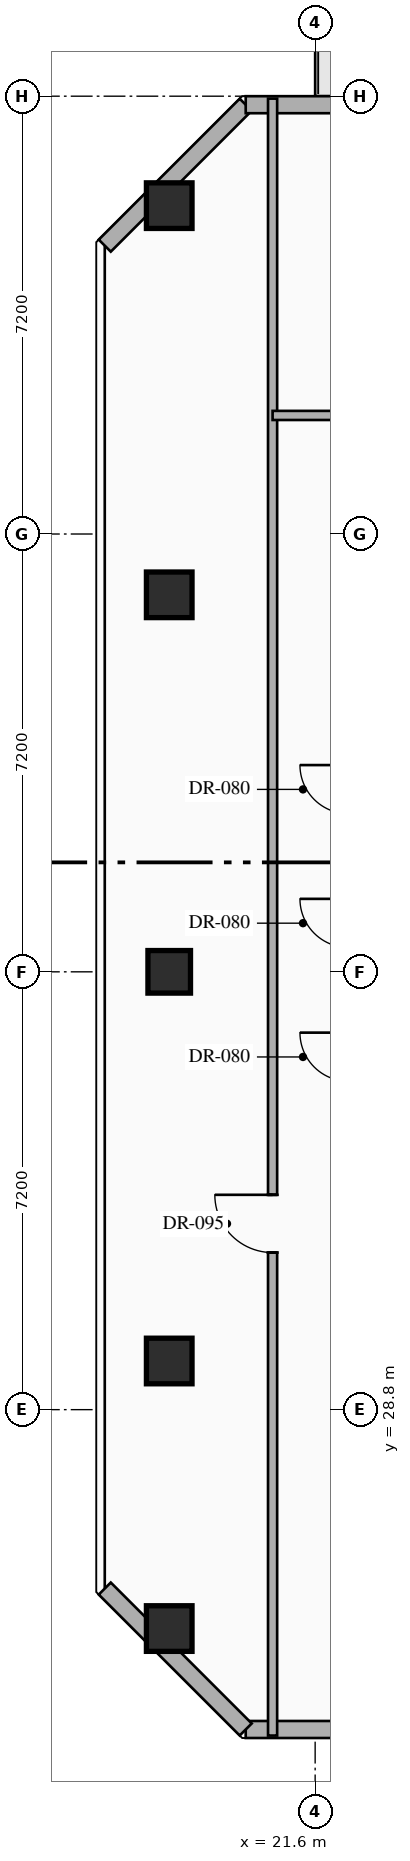
"""IFC4 building model, lengths in metres.
Left out: names, types, materials, properties, quantities, classifications, styles, units other than length and angle.
Written with IfcOpenShell. Run it as: python <this file> out.ifc"""

import sys

from ifc_helpers import new_model, si_unit, direction, frame, frame_2d, origin, origin_2d, place, context, subcontext, project, spatial, rectangle, hollow_rectangle, extrude, element, fill, save


model = new_model("IFC4")
c1 = context("Model", 3, precision=1e-05, world=origin(), true_north=direction((0.0, 1.0)))
c2 = subcontext(c1, "Body", "Model", "MODEL_VIEW")
j1 = project(units=[si_unit("LENGTHUNIT", "METRE"), si_unit("PLANEANGLEUNIT", "RADIAN")], contexts=[c1])
p1 = place(None, origin())
s1 = spatial("IfcSite", under=j1, at=p1, CompositionType="ELEMENT")
p2 = place(p1, origin())
s2 = spatial("IfcBuilding", under=s1, at=p2, CompositionType="ELEMENT")
p3 = place(p2, frame((0.0, 0.0, 191.55)))
s3 = spatial("IfcBuildingStorey", under=s2, at=p3, CompositionType="ELEMENT", Elevation=191.55)
for number, where, z_axis, x_axis in (
    (1, (19.2, 48.6, 0.0), (0.0, 0.0, 1.0), (1.0, 0.0, 0.0)),
    (2, (19.2, 25.2, 0.0), (0.0, 0.0, 1.0), (1.0, 0.0, 0.0)),
    (3, (19.2, 29.6, 0.0), (0.0, 0.0, 1.0), (1.0, 0.0, 0.0)),
    (4, (19.2, 42.2, 0.0), (0.0, 0.0, 1.0), (1.0, 0.0, 0.0)),
):
    element("IfcColumn", number, at=place(p3, frame(where, z_axis=z_axis, x_axis=x_axis)), inside=s3, PredefinedType="COLUMN", context=c2, shape_type="SweptSolid", body=[
        extrude(hollow_rectangle(XDim=0.75, YDim=0.75, WallThickness=0.028, at=origin_2d()), origin(), (0.0, 0.0, 1.0), 3.6),
    ])
p4 = place(p3, frame((19.2, 36.0, 0.0), z_axis=(0.0, 0.0, 1.0), x_axis=(1.0, 0.0, 0.0)))
e5 = element("IfcColumn", 5, at=p4, inside=s3, PredefinedType="COLUMN", context=c2, shape_type="SweptSolid", body=[
    extrude(hollow_rectangle(XDim=0.7, YDim=0.7, WallThickness=0.028, at=origin_2d()), origin(), (0.0, 0.0, 1.0), 3.6),
])
p5 = place(p3, frame((25.247, 23.54, 0.0), z_axis=(0.0, 0.0, 1.0), x_axis=(-1.0, 0.0, 0.0)))
e6 = element("IfcWall", 6, at=p5, inside=s3, PredefinedType="STANDARD", context=c2, shape_type="SweptSolid", body=[
    extrude(rectangle(XDim=4.789, YDim=0.28, at=frame_2d((2.395, 0.0))), origin(), (0.0, 0.0, 1.0), 3.35),
])
p6 = place(p3, frame((20.458, 23.54, 0.0), z_axis=(0.0, 0.0, 1.0), x_axis=(-0.707144017911, 0.707069542501, 0.0)))
e7 = element("IfcWall", 7, at=p6, inside=s3, PredefinedType="STANDARD", context=c2, shape_type="SweptSolid", body=[
    extrude(rectangle(XDim=3.278, YDim=0.28, at=frame_2d((1.639, 0.0))), origin(), (0.0, 0.0, 1.0), 3.35),
])
p7 = place(p3, frame((18.14, 47.942, 0.0), z_axis=(0.0, 0.0, 1.0), x_axis=(0.707106781187, 0.707106781187, 0.0)))
e8 = element("IfcWall", 8, at=p7, inside=s3, PredefinedType="STANDARD", context=c2, shape_type="SweptSolid", body=[
    extrude(rectangle(XDim=3.278, YDim=0.28, at=frame_2d((1.639, 0.0))), origin(), (0.0, 0.0, 1.0), 3.35),
])
p8 = place(p3, frame((20.458, 50.26, 0.0), z_axis=(0.0, 0.0, 1.0), x_axis=(1.0, 0.0, 0.0)))
e9 = element("IfcWall", 9, at=p8, inside=s3, PredefinedType="STANDARD", context=c2, shape_type="SweptSolid", body=[
    extrude(rectangle(XDim=22.084, YDim=0.28, at=frame_2d((11.042, 0.0))), origin(), (0.0, 0.0, 1.0), 3.35),
])
p9 = place(p8, frame((2.1, 0.0, 0.0)))
e10 = element("IfcOpeningElement", 10, at=p9, cuts=e9, PredefinedType="OPENING", context=c2, shape_type="SweptSolid", body=[
    extrude(rectangle(XDim=1.1, YDim=2.2, at=frame_2d((0.55, 1.1))), frame((0.0, 0.15, 0.0), z_axis=(0.0, -1.0, 0.0), x_axis=(1.0, 0.0, 0.0)), (0.0, 0.0, 1.0), 0.3),
])
p10 = place(p8, frame((15.663, 0.0, 0.85)))
e11 = element("IfcOpeningElement", 11, at=p10, cuts=e9, PredefinedType="OPENING", context=c2, shape_type="SweptSolid", body=[
    extrude(rectangle(XDim=1.8, YDim=2.1, at=frame_2d((0.9, 1.05))), frame((0.0, 0.15, 0.0), z_axis=(0.0, -1.0, 0.0), x_axis=(1.0, 0.0, 0.0)), (0.0, 0.0, 1.0), 0.3),
])
p11 = place(p3, frame((20.9, 23.44, 0.0), z_axis=(0.0, 0.0, 1.0), x_axis=(0.0, 1.0, 0.0)))
e12 = element("IfcWall", 12, at=p11, inside=s3, PredefinedType="PARTITIONING", context=c2, shape_type="SweptSolid", body=[
    extrude(rectangle(XDim=26.92, YDim=0.15, at=frame_2d((13.46, 0.0))), origin(), (0.0, 0.0, 1.0), 3.35),
])
p12 = place(p11, frame((7.943, 0.0, 0.0)))
e13 = element("IfcOpeningElement", 13, at=p12, cuts=e12, PredefinedType="OPENING", context=c2, shape_type="SweptSolid", body=[
    extrude(rectangle(XDim=0.95, YDim=2.15, at=frame_2d((0.475, 1.075))), frame((0.0, 0.085, 0.0), z_axis=(0.0, -1.0, 0.0), x_axis=(1.0, 0.0, 0.0)), (0.0, 0.0, 1.0), 0.17),
])
p13 = place(p3, frame((20.9, 45.15, 0.0), z_axis=(0.0, 0.0, 1.0), x_axis=(1.0, 0.0, 0.0)))
e14 = element("IfcWall", 14, at=p13, inside=s3, PredefinedType="PARTITIONING", context=c2, shape_type="SweptSolid", body=[
    extrude(rectangle(XDim=24.06, YDim=0.15, at=frame_2d((12.03, 0.0))), origin(), (0.0, 0.0, 1.0), 3.35),
])
p14 = place(p13, frame((9.32, 0.0, 0.0)))
e15 = element("IfcOpeningElement", 15, at=p14, cuts=e14, PredefinedType="OPENING", context=c2, shape_type="SweptSolid", body=[
    extrude(rectangle(XDim=0.95, YDim=2.15, at=frame_2d((0.475, 1.075))), frame((0.0, 0.085, 0.0), z_axis=(0.0, -1.0, 0.0), x_axis=(1.0, 0.0, 0.0)), (0.0, 0.0, 1.0), 0.17),
])
p15 = place(p12, origin())
e16 = element("IfcDoor", 16, at=p15, inside=s3, OperationType="SINGLE_SWING_RIGHT", PredefinedType="DOOR", context=c2, shape_type="SweptSolid", body=[
    extrude(rectangle(XDim=0.95, YDim=2.15, at=frame_2d((0.475, 1.075))), frame((0.0, 0.025, 0.0), z_axis=(0.0, -1.0, 0.0), x_axis=(1.0, 0.0, 0.0)), (0.0, 0.0, 1.0), 0.05),
])
fill(e13, e16)
save(model, sys.argv[1])
